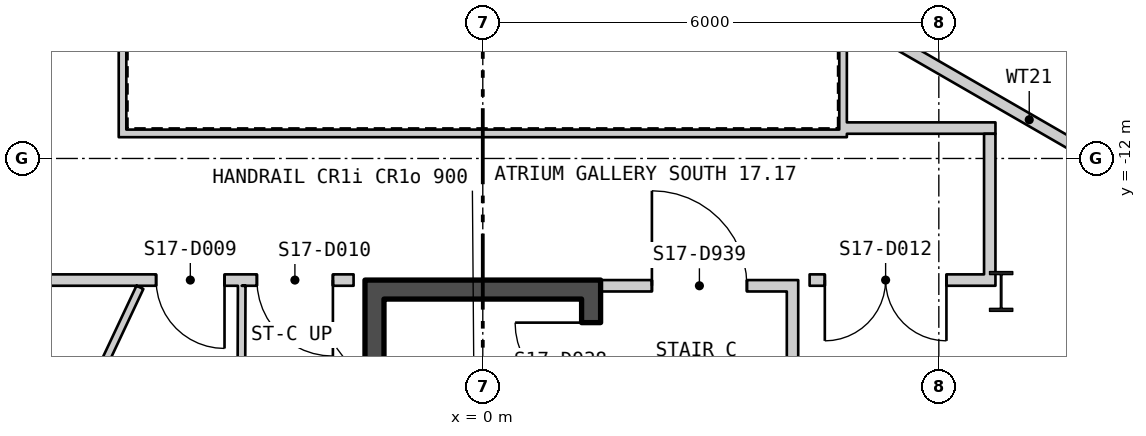
"""IFC4 building model, lengths in metres.
Left out: names, types, materials, properties, quantities, classifications, styles, units other than length and angle.
Written with IfcOpenShell. Run it as: python <this file> out.ifc"""

import sys

from ifc_helpers import new_model, si_unit, direction, frame, frame_2d, origin, origin_2d, place, context, subcontext, project, spatial, polyline, rectangle, i_section, outline, extrude, element, fill, save


model = new_model("IFC4")
c1 = context("Model", 3, precision=1e-05, world=origin(), true_north=direction((0.0, 1.0)))
c2 = subcontext(c1, "Body", "Model", "MODEL_VIEW")
j1 = project(units=[si_unit("LENGTHUNIT", "METRE"), si_unit("PLANEANGLEUNIT", "RADIAN")], contexts=[c1])
p1 = place(None, origin())
s1 = spatial("IfcSite", under=j1, at=p1, CompositionType="ELEMENT")
p2 = place(p1, origin())
s2 = spatial("IfcBuilding", under=s1, at=p2, CompositionType="ELEMENT")
p3 = place(p2, frame((0.0, 0.0, 227.7)))
s3 = spatial("IfcBuildingStorey", under=s2, at=p3, CompositionType="ELEMENT", Elevation=227.7)
p4 = place(p3, frame((6.82, -13.75, 0.0), z_axis=(0.0, 0.0, 1.0), x_axis=(1.0, 0.0, 0.0)))
e1 = element("IfcColumn", 1, at=p4, inside=s3, PredefinedType="COLUMN", context=c2, shape_type="SweptSolid", body=[
    extrude(i_section(OverallWidth=0.306, OverallDepth=0.524, WebThickness=0.021, FlangeThickness=0.04, at=origin_2d()), origin(), (0.0, 0.0, 1.0), 3.9),
])
p5 = place(p3, frame((-26.075, 14.415, -0.18), z_axis=(0.0, 0.0, 1.0), x_axis=(0.499999194392, -0.866025868902, 0.0)))
e2 = element("IfcWall", 2, at=p5, inside=s3, PredefinedType="SOLIDWALL", context=c2, shape_type="SweptSolid", body=[
    extrude(outline(polyline([(-0.13, -0.225), (45.86, -0.225), (45.6, 0.225), (0.13, 0.225), (-0.13, -0.225)])), origin(), (0.0, 0.0, 1.0), 3.68),
])
p6 = place(p5, frame((1.424, 0.0, 1.08)))
e3 = element("IfcOpeningElement", 3, at=p6, cuts=e2, PredefinedType="OPENING", context=c2, shape_type="SweptSolid", body=[
    extrude(rectangle(XDim=2.4, YDim=2.0, at=frame_2d((1.2, 1.0))), frame((0.0, 0.235, 0.0), z_axis=(0.0, -1.0, 0.0), x_axis=(1.0, 0.0, 0.0)), (0.0, 0.0, 1.0), 0.47),
])
p7 = place(p5, frame((5.892, 0.0, 1.08)))
e4 = element("IfcOpeningElement", 4, at=p7, cuts=e2, PredefinedType="OPENING", context=c2, shape_type="SweptSolid", body=[
    extrude(rectangle(XDim=2.4, YDim=2.0, at=frame_2d((1.2, 1.0))), frame((0.0, 0.235, 0.0), z_axis=(0.0, -1.0, 0.0), x_axis=(1.0, 0.0, 0.0)), (0.0, 0.0, 1.0), 0.47),
])
p8 = place(p5, frame((10.399, 0.0, 1.08)))
e5 = element("IfcOpeningElement", 5, at=p8, cuts=e2, PredefinedType="OPENING", context=c2, shape_type="SweptSolid", body=[
    extrude(rectangle(XDim=2.4, YDim=2.0, at=frame_2d((1.2, 1.0))), frame((0.0, 0.235, 0.0), z_axis=(0.0, -1.0, 0.0), x_axis=(1.0, 0.0, 0.0)), (0.0, 0.0, 1.0), 0.47),
])
p9 = place(p5, frame((19.412, 0.0, 1.08)))
e6 = element("IfcOpeningElement", 6, at=p9, cuts=e2, PredefinedType="OPENING", context=c2, shape_type="SweptSolid", body=[
    extrude(rectangle(XDim=2.4, YDim=2.0, at=frame_2d((1.2, 1.0))), frame((0.0, 0.235, 0.0), z_axis=(0.0, -1.0, 0.0), x_axis=(1.0, 0.0, 0.0)), (0.0, 0.0, 1.0), 0.47),
])
p10 = place(p5, frame((23.918, 0.0, 1.08)))
e7 = element("IfcOpeningElement", 7, at=p10, cuts=e2, PredefinedType="OPENING", context=c2, shape_type="SweptSolid", body=[
    extrude(rectangle(XDim=2.4, YDim=2.0, at=frame_2d((1.2, 1.0))), frame((0.0, 0.235, 0.0), z_axis=(0.0, -1.0, 0.0), x_axis=(1.0, 0.0, 0.0)), (0.0, 0.0, 1.0), 0.47),
])
p11 = place(p5, frame((28.425, 0.0, 1.08)))
e8 = element("IfcOpeningElement", 8, at=p11, cuts=e2, PredefinedType="OPENING", context=c2, shape_type="SweptSolid", body=[
    extrude(rectangle(XDim=2.4, YDim=2.0, at=frame_2d((1.2, 1.0))), frame((0.0, 0.235, 0.0), z_axis=(0.0, -1.0, 0.0), x_axis=(1.0, 0.0, 0.0)), (0.0, 0.0, 1.0), 0.47),
])
p12 = place(p5, frame((32.932, 0.0, 1.08)))
e9 = element("IfcOpeningElement", 9, at=p12, cuts=e2, PredefinedType="OPENING", context=c2, shape_type="SweptSolid", body=[
    extrude(rectangle(XDim=2.4, YDim=2.0, at=frame_2d((1.2, 1.0))), frame((0.0, 0.235, 0.0), z_axis=(0.0, -1.0, 0.0), x_axis=(1.0, 0.0, 0.0)), (0.0, 0.0, 1.0), 0.47),
])
p13 = place(p5, frame((41.907, 0.0, 1.08)))
e10 = element("IfcOpeningElement", 10, at=p13, cuts=e2, PredefinedType="OPENING", context=c2, shape_type="SweptSolid", body=[
    extrude(rectangle(XDim=2.4, YDim=2.0, at=frame_2d((1.2, 1.0))), frame((0.0, 0.235, 0.0), z_axis=(0.0, -1.0, 0.0), x_axis=(1.0, 0.0, 0.0)), (0.0, 0.0, 1.0), 0.47),
])
p14 = place(p3, frame((3.21, -25.189, -0.18), z_axis=(0.0, 0.0, 1.0), x_axis=(0.499999194392, 0.866025868902, 0.0)))
e11 = element("IfcWall", 11, at=p14, inside=s3, PredefinedType="SOLIDWALL", context=c2, shape_type="SweptSolid", body=[
    extrude(outline(polyline([(-0.13, -0.225), (45.86, -0.225), (45.6, 0.225), (0.13, 0.225), (-0.13, -0.225)])), origin(), (0.0, 0.0, 1.0), 3.68),
])
p15 = place(p14, frame((1.424, 0.0, 1.08)))
e12 = element("IfcOpeningElement", 12, at=p15, cuts=e11, PredefinedType="OPENING", context=c2, shape_type="SweptSolid", body=[
    extrude(rectangle(XDim=2.4, YDim=2.0, at=frame_2d((1.2, 1.0))), frame((0.0, 0.235, 0.0), z_axis=(0.0, -1.0, 0.0), x_axis=(1.0, 0.0, 0.0)), (0.0, 0.0, 1.0), 0.47),
])
p16 = place(p14, frame((5.892, 0.0, 1.08)))
e13 = element("IfcOpeningElement", 13, at=p16, cuts=e11, PredefinedType="OPENING", context=c2, shape_type="SweptSolid", body=[
    extrude(rectangle(XDim=2.4, YDim=2.0, at=frame_2d((1.2, 1.0))), frame((0.0, 0.235, 0.0), z_axis=(0.0, -1.0, 0.0), x_axis=(1.0, 0.0, 0.0)), (0.0, 0.0, 1.0), 0.47),
])
p17 = place(p14, frame((10.399, 0.0, 1.08)))
e14 = element("IfcOpeningElement", 14, at=p17, cuts=e11, PredefinedType="OPENING", context=c2, shape_type="SweptSolid", body=[
    extrude(rectangle(XDim=2.4, YDim=2.0, at=frame_2d((1.2, 1.0))), frame((0.0, 0.235, 0.0), z_axis=(0.0, -1.0, 0.0), x_axis=(1.0, 0.0, 0.0)), (0.0, 0.0, 1.0), 0.47),
])
p18 = place(p14, frame((14.905, 0.0, 1.08)))
e15 = element("IfcOpeningElement", 15, at=p18, cuts=e11, PredefinedType="OPENING", context=c2, shape_type="SweptSolid", body=[
    extrude(rectangle(XDim=2.4, YDim=2.0, at=frame_2d((1.2, 1.0))), frame((0.0, 0.235, 0.0), z_axis=(0.0, -1.0, 0.0), x_axis=(1.0, 0.0, 0.0)), (0.0, 0.0, 1.0), 0.47),
])
p19 = place(p14, frame((19.412, 0.0, 1.08)))
e16 = element("IfcOpeningElement", 16, at=p19, cuts=e11, PredefinedType="OPENING", context=c2, shape_type="SweptSolid", body=[
    extrude(rectangle(XDim=2.4, YDim=2.0, at=frame_2d((1.2, 1.0))), frame((0.0, 0.235, 0.0), z_axis=(0.0, -1.0, 0.0), x_axis=(1.0, 0.0, 0.0)), (0.0, 0.0, 1.0), 0.47),
])
p20 = place(p14, frame((23.918, 0.0, 1.08)))
e17 = element("IfcOpeningElement", 17, at=p20, cuts=e11, PredefinedType="OPENING", context=c2, shape_type="SweptSolid", body=[
    extrude(rectangle(XDim=2.4, YDim=2.0, at=frame_2d((1.2, 1.0))), frame((0.0, 0.235, 0.0), z_axis=(0.0, -1.0, 0.0), x_axis=(1.0, 0.0, 0.0)), (0.0, 0.0, 1.0), 0.47),
])
p21 = place(p14, frame((32.932, 0.0, 1.08)))
e18 = element("IfcOpeningElement", 18, at=p21, cuts=e11, PredefinedType="OPENING", context=c2, shape_type="SweptSolid", body=[
    extrude(rectangle(XDim=2.4, YDim=2.0, at=frame_2d((1.2, 1.0))), frame((0.0, 0.235, 0.0), z_axis=(0.0, -1.0, 0.0), x_axis=(1.0, 0.0, 0.0)), (0.0, 0.0, 1.0), 0.47),
])
p22 = place(p14, frame((37.438, 0.0, 1.08)))
e19 = element("IfcOpeningElement", 19, at=p22, cuts=e11, PredefinedType="OPENING", context=c2, shape_type="SweptSolid", body=[
    extrude(rectangle(XDim=2.4, YDim=2.0, at=frame_2d((1.2, 1.0))), frame((0.0, 0.235, 0.0), z_axis=(0.0, -1.0, 0.0), x_axis=(1.0, 0.0, 0.0)), (0.0, 0.0, 1.0), 0.47),
])
p23 = place(p14, frame((41.907, 0.0, 1.08)))
e20 = element("IfcOpeningElement", 20, at=p23, cuts=e11, PredefinedType="OPENING", context=c2, shape_type="SweptSolid", body=[
    extrude(rectangle(XDim=2.4, YDim=2.0, at=frame_2d((1.2, 1.0))), frame((0.0, 0.235, 0.0), z_axis=(0.0, -1.0, 0.0), x_axis=(1.0, 0.0, 0.0)), (0.0, 0.0, 1.0), 0.47),
])
p24 = place(p3, frame((-4.79, -11.67, 0.0), z_axis=(0.0, 0.0, 1.0), x_axis=(1.0, 0.0, 0.0)))
e21 = element("IfcWall", 21, at=p24, inside=s3, PredefinedType="PARTITIONING", context=c2, shape_type="SweptSolid", body=[
    extrude(rectangle(XDim=9.58, YDim=0.1, at=frame_2d((4.79, 0.0))), origin(), (0.0, 0.0, 1.0), 3.7),
])
for number, where, z_axis, x_axis in (
    (22, (4.74, -11.62, 0.0), (0.0, 0.0, 1.0), (0.0, 1.0, 0.0)),
    (23, (-4.74, -3.58, 0.0), (0.0, 0.0, 1.0), (0.0, -1.0, 0.0)),
):
    element("IfcWall", number, at=place(p3, frame(where, z_axis=z_axis, x_axis=x_axis)), inside=s3, PredefinedType="PARTITIONING", context=c2, shape_type="SweptSolid", body=[
        extrude(rectangle(XDim=8.04, YDim=0.1, at=frame_2d((4.02, 0.0))), origin(), (0.0, 0.0, 1.0), 3.7),
    ])
p25 = place(p3, frame((-1.425, -21.05, 0.0), z_axis=(0.0, 0.0, 1.0), x_axis=(0.0, 1.0, 0.0)))
e24 = element("IfcWall", 24, at=p25, inside=s3, PredefinedType="SHEAR", context=c2, shape_type="SweptSolid", body=[
    extrude(rectangle(XDim=7.2, YDim=0.25, at=frame_2d((3.6, 0.0))), origin(), (0.0, 0.0, 1.0), 3.7),
])
p26 = place(p3, frame((1.425, -21.05, 0.0), z_axis=(0.0, 0.0, 1.0), x_axis=(0.0, 1.0, 0.0)))
e25 = element("IfcWall", 25, at=p26, inside=s3, PredefinedType="SHEAR", context=c2, shape_type="SweptSolid", body=[
    extrude(rectangle(XDim=7.2, YDim=0.25, at=frame_2d((3.6, 0.0))), origin(), (0.0, 0.0, 1.0), 3.7),
])
p27 = place(p26, frame((5.89, 0.0, 0.0)))
e26 = element("IfcOpeningElement", 26, at=p27, cuts=e25, PredefinedType="OPENING", context=c2, shape_type="SweptSolid", body=[
    extrude(rectangle(XDim=1.0, YDim=2.1, at=frame_2d((0.5, 1.05))), frame((0.0, 0.135, 0.0), z_axis=(0.0, -1.0, 0.0), x_axis=(1.0, 0.0, 0.0)), (0.0, 0.0, 1.0), 0.27),
])
p28 = place(p3, frame((-1.55, -13.725, 0.0), z_axis=(0.0, 0.0, 1.0), x_axis=(1.0, 0.0, 0.0)))
e27 = element("IfcWall", 27, at=p28, inside=s3, PredefinedType="SHEAR", context=c2, shape_type="SweptSolid", body=[
    extrude(rectangle(XDim=3.1, YDim=0.25, at=frame_2d((1.55, 0.0))), origin(), (0.0, 0.0, 1.0), 3.7),
])
p29 = place(p3, frame((4.075, -16.15, 0.0), z_axis=(0.0, 0.0, 1.0), x_axis=(0.0, 1.0, 0.0)))
e28 = element("IfcWall", 28, at=p29, inside=s3, PredefinedType="PARTITIONING", context=c2, shape_type="SweptSolid", body=[
    extrude(rectangle(XDim=2.4, YDim=0.15, at=frame_2d((1.2, 0.0))), origin(), (0.0, 0.0, 1.0), 3.7),
])
p30 = place(p3, frame((1.55, -13.675, 0.0), z_axis=(0.0, 0.0, 1.0), x_axis=(1.0, 0.0, 0.0)))
e29 = element("IfcWall", 29, at=p30, inside=s3, PredefinedType="PARTITIONING", context=c2, shape_type="SweptSolid", body=[
    extrude(rectangle(XDim=2.6, YDim=0.15, at=frame_2d((1.3, 0.0))), origin(), (0.0, 0.0, 1.0), 2.91),
])
p31 = place(p30, frame((0.675, 0.0, 0.0)))
e30 = element("IfcOpeningElement", 30, at=p31, cuts=e29, PredefinedType="OPENING", context=c2, shape_type="SweptSolid", body=[
    extrude(rectangle(XDim=1.25, YDim=2.1, at=frame_2d((0.625, 1.05))), frame((0.0, 0.085, 0.0), z_axis=(0.0, -1.0, 0.0), x_axis=(1.0, 0.0, 0.0)), (0.0, 0.0, 1.0), 0.17),
])
p32 = place(p3, frame((-6.789, -18.539, 0.0), z_axis=(0.0, 0.0, 1.0), x_axis=(0.425635061069, 0.904894908146, 0.0)))
e31 = element("IfcWall", 31, at=p32, inside=s3, PredefinedType="PARTITIONING", context=c2, shape_type="SweptSolid", body=[
    extrude(rectangle(XDim=5.352, YDim=0.1, at=frame_2d((2.676, 0.0))), origin(), (0.0, 0.0, 1.0), 3.7),
])
p33 = place(p3, frame((-6.595, -13.6, 0.0), z_axis=(0.0, 0.0, 1.0), x_axis=(1.0, 0.0, 0.0)))
e32 = element("IfcWall", 32, at=p33, inside=s3, PredefinedType="PARTITIONING", context=c2, shape_type="SweptSolid", body=[
    extrude(rectangle(XDim=4.895, YDim=0.15, at=frame_2d((2.447, 0.0))), origin(), (0.0, 0.0, 1.0), 2.91),
])
p34 = place(p33, frame((2.297, 0.0, 0.0)))
e33 = element("IfcOpeningElement", 33, at=p34, cuts=e32, PredefinedType="OPENING", context=c2, shape_type="SweptSolid", body=[
    extrude(rectangle(XDim=0.9, YDim=2.1, at=frame_2d((0.45, 1.05))), frame((0.0, 0.085, 0.0), z_axis=(0.0, -1.0, 0.0), x_axis=(1.0, 0.0, 0.0)), (0.0, 0.0, 1.0), 0.17),
])
p35 = place(p33, frame((3.623, 0.0, 0.0)))
e34 = element("IfcOpeningElement", 34, at=p35, cuts=e32, PredefinedType="OPENING", context=c2, shape_type="SweptSolid", body=[
    extrude(rectangle(XDim=1.0, YDim=2.1, at=frame_2d((0.5, 1.05))), frame((0.0, 0.085, 0.0), z_axis=(0.0, -1.0, 0.0), x_axis=(1.0, 0.0, 0.0)), (0.0, 0.0, 1.0), 0.17),
])
p36 = place(p3, frame((-3.192, -19.591, 0.0), z_axis=(0.0, 0.0, 1.0), x_axis=(0.003380643291, 0.999994285609, 0.0)))
e35 = element("IfcWall", 35, at=p36, inside=s3, PredefinedType="PARTITIONING", context=c2, shape_type="SweptSolid", body=[
    extrude(rectangle(XDim=5.916, YDim=0.1, at=frame_2d((2.958, 0.0))), origin(), (0.0, 0.0, 1.0), 3.01),
])
p37 = place(p3, frame((4.3, -13.6, 0.0), z_axis=(0.0, 0.0, 1.0), x_axis=(1.0, 0.0, 0.0)))
e36 = element("IfcWall", 36, at=p37, inside=s3, PredefinedType="PARTITIONING", context=c2, shape_type="SweptSolid", body=[
    extrude(rectangle(XDim=2.445, YDim=0.15, at=frame_2d((1.222, 0.0))), origin(), (0.0, 0.0, 1.0), 2.91),
])
p38 = place(p37, frame((0.2, 0.0, 0.0)))
e37 = element("IfcOpeningElement", 37, at=p38, cuts=e36, PredefinedType="OPENING", context=c2, shape_type="SweptSolid", body=[
    extrude(rectangle(XDim=1.6, YDim=2.1, at=frame_2d((0.8, 1.05))), frame((0.0, 0.085, 0.0), z_axis=(0.0, -1.0, 0.0), x_axis=(1.0, 0.0, 0.0)), (0.0, 0.0, 1.0), 0.17),
])
p39 = place(p3, frame((4.79, -11.6, 0.0), z_axis=(0.0, 0.0, 1.0), x_axis=(1.0, 0.0, 0.0)))
e38 = element("IfcWall", 38, at=p39, inside=s3, PredefinedType="PARTITIONING", context=c2, shape_type="SweptSolid", body=[
    extrude(rectangle(XDim=1.955, YDim=0.15, at=frame_2d((0.978, 0.0))), origin(), (0.0, 0.0, 1.0), 3.7),
])
p40 = place(p3, frame((4.827, -10.127, 0.0), z_axis=(0.0, 0.0, 1.0), x_axis=(0.866103179807, -0.499865263774, 0.0)))
e39 = element("IfcWall", 39, at=p40, inside=s3, PredefinedType="PARTITIONING", context=c2, shape_type="SweptSolid", body=[
    extrude(rectangle(XDim=5.455, YDim=0.15, at=frame_2d((2.728, 0.0))), origin(), (0.0, 0.0, 1.0), 3.7),
])
p41 = place(p3, frame((6.67, -13.525, 0.0), z_axis=(0.0, 0.0, 1.0), x_axis=(0.0, 1.0, 0.0)))
e40 = element("IfcWall", 40, at=p41, inside=s3, PredefinedType="PARTITIONING", context=c2, shape_type="SweptSolid", body=[
    extrude(rectangle(XDim=1.85, YDim=0.15, at=frame_2d((0.925, 0.0))), origin(), (0.0, 0.0, 1.0), 3.11),
])
p42 = place(p27, origin())
e41 = element("IfcDoor", 41, at=p42, inside=s3, OperationType="SINGLE_SWING_LEFT", PredefinedType="DOOR", context=c2, shape_type="SweptSolid", body=[
    extrude(rectangle(XDim=1.0, YDim=2.1, at=frame_2d((0.5, 1.05))), frame((0.0, 0.025, 0.0), z_axis=(0.0, -1.0, 0.0), x_axis=(1.0, 0.0, 0.0)), (0.0, 0.0, 1.0), 0.05),
])
fill(e26, e41)
p43 = place(p31, origin())
e42 = element("IfcDoor", 42, at=p43, inside=s3, OperationType="SINGLE_SWING_RIGHT", PredefinedType="DOOR", context=c2, shape_type="SweptSolid", body=[
    extrude(rectangle(XDim=1.25, YDim=2.1, at=frame_2d((0.625, 1.05))), frame((0.0, 0.025, 0.0), z_axis=(0.0, -1.0, 0.0), x_axis=(1.0, 0.0, 0.0)), (0.0, 0.0, 1.0), 0.05),
])
fill(e30, e42)
p44 = place(p34, origin())
e43 = element("IfcDoor", 43, at=p44, inside=s3, OperationType="SINGLE_SWING_RIGHT", PredefinedType="DOOR", context=c2, shape_type="SweptSolid", body=[
    extrude(rectangle(XDim=0.9, YDim=2.1, at=frame_2d((0.45, 1.05))), frame((0.0, 0.025, 0.0), z_axis=(0.0, -1.0, 0.0), x_axis=(1.0, 0.0, 0.0)), (0.0, 0.0, 1.0), 0.05),
])
fill(e33, e43)
p45 = place(p35, origin())
e44 = element("IfcDoor", 44, at=p45, inside=s3, OperationType="SINGLE_SWING_RIGHT", PredefinedType="DOOR", context=c2, shape_type="SweptSolid", body=[
    extrude(rectangle(XDim=1.0, YDim=2.1, at=frame_2d((0.5, 1.05))), frame((0.0, 0.025, 0.0), z_axis=(0.0, -1.0, 0.0), x_axis=(1.0, 0.0, 0.0)), (0.0, 0.0, 1.0), 0.05),
])
fill(e34, e44)
p46 = place(p38, origin())
e45 = element("IfcDoor", 45, at=p46, inside=s3, OperationType="DOUBLE_DOOR_SINGLE_SWING", PredefinedType="DOOR", context=c2, shape_type="SweptSolid", body=[
    extrude(rectangle(XDim=1.6, YDim=2.1, at=frame_2d((0.8, 1.05))), frame((0.0, 0.025, 0.0), z_axis=(0.0, -1.0, 0.0), x_axis=(1.0, 0.0, 0.0)), (0.0, 0.0, 1.0), 0.05),
])
fill(e37, e45)
save(model, sys.argv[1])
